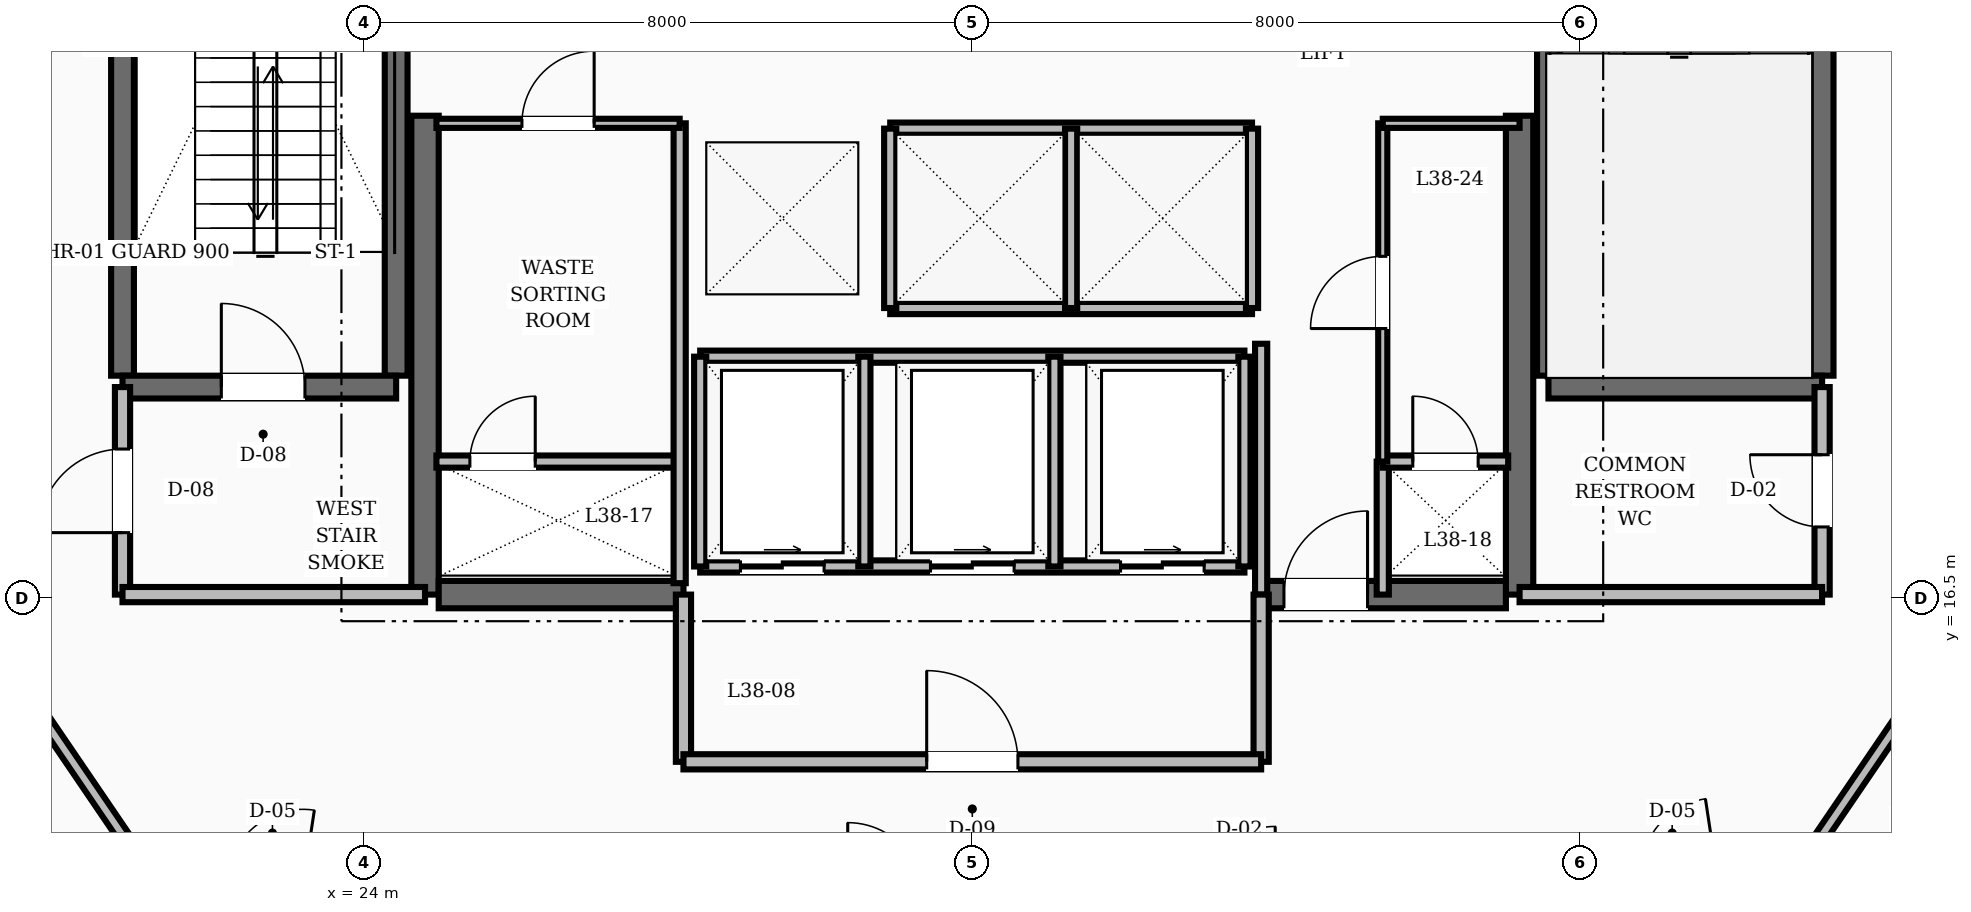
"""IFC4 building model, lengths in metres.
Left out: names, types, materials, properties, quantities, classifications, styles, units other than length and angle.
Written with IfcOpenShell. Run it as: python <this file> out.ifc"""

import sys

from ifc_helpers import new_model, si_unit, direction, frame, frame_2d, origin, place, context, subcontext, project, spatial, rectangle, extrude, element, fill, save


model = new_model("IFC4")
c1 = context("Model", 3, precision=1e-05, world=origin(), true_north=direction((0.0, 1.0)))
c2 = subcontext(c1, "Body", "Model", "MODEL_VIEW")
j1 = project(units=[si_unit("LENGTHUNIT", "METRE"), si_unit("PLANEANGLEUNIT", "RADIAN")], contexts=[c1])
p1 = place(None, origin())
s1 = spatial("IfcSite", under=j1, at=p1, CompositionType="ELEMENT")
p2 = place(p1, origin())
s2 = spatial("IfcBuilding", under=s1, at=p2, CompositionType="ELEMENT")
p3 = place(p2, frame((0.0, 0.0, 149.6)))
s3 = spatial("IfcBuildingStorey", under=s2, at=p3, CompositionType="ELEMENT", Elevation=149.6)
for number, where, z_axis, x_axis in (
    (1, (24.8, 16.55, 0.0), (0.0, 0.0, 1.0), (0.0, 1.0, 0.0)),
    (2, (39.2, 16.55, 0.0), (0.0, 0.0, 1.0), (0.0, 1.0, 0.0)),
):
    element("IfcWall", number, at=place(p3, frame(where, z_axis=z_axis, x_axis=x_axis)), inside=s3, PredefinedType="SHEAR", context=c2, shape_type="SweptSolid", body=[
        extrude(rectangle(XDim=6.3, YDim=0.36, at=frame_2d((3.15, 0.0))), origin(), (0.0, 0.0, 1.0), 3.6),
    ])
p4 = place(p3, frame((24.98, 16.55, 0.0), z_axis=(0.0, 0.0, 1.0), x_axis=(1.0, 0.0, 0.0)))
e3 = element("IfcWall", 3, at=p4, inside=s3, PredefinedType="SHEAR", context=c2, shape_type="SweptSolid", body=[
    extrude(rectangle(XDim=3.22, YDim=0.36, at=frame_2d((1.61, 0.0))), origin(), (0.0, 0.0, 1.0), 3.6),
])
p5 = place(p3, frame((35.8, 16.55, 0.0), z_axis=(0.0, 0.0, 1.0), x_axis=(1.0, 0.0, 0.0)))
e4 = element("IfcWall", 4, at=p5, inside=s3, PredefinedType="SHEAR", context=c2, shape_type="SweptSolid", body=[
    extrude(rectangle(XDim=3.22, YDim=0.36, at=frame_2d((1.61, 0.0))), origin(), (0.0, 0.0, 1.0), 3.6),
])
p6 = place(p5, frame((0.3, 0.0, 0.0)))
e5 = element("IfcOpeningElement", 5, at=p6, cuts=e4, PredefinedType="OPENING", context=c2, shape_type="SweptSolid", body=[
    extrude(rectangle(XDim=1.1, YDim=2.1, at=frame_2d((0.55, 1.05))), frame((0.0, 0.19, 0.0), z_axis=(0.0, -1.0, 0.0), x_axis=(1.0, 0.0, 0.0)), (0.0, 0.0, 1.0), 0.38),
])
for number, where, z_axis, x_axis in (
    (6, (20.82, 19.43, 0.0), (0.0, 0.0, 1.0), (0.0, 1.0, 0.0)),
    (7, (24.42, 19.43, 0.0), (0.0, 0.0, 1.0), (0.0, 1.0, 0.0)),
):
    element("IfcWall", number, at=place(p3, frame(where, z_axis=z_axis, x_axis=x_axis)), inside=s3, PredefinedType="SHEAR", context=c2, shape_type="SweptSolid", body=[
        extrude(rectangle(XDim=8.74, YDim=0.3, at=frame_2d((4.37, 0.0))), origin(), (0.0, 0.0, 1.0), 3.6),
    ])
p7 = place(p3, frame((20.82, 19.28, 0.0), z_axis=(0.0, 0.0, 1.0), x_axis=(1.0, 0.0, 0.0)))
e8 = element("IfcWall", 8, at=p7, inside=s3, PredefinedType="SHEAR", context=c2, shape_type="SweptSolid", body=[
    extrude(rectangle(XDim=3.6, YDim=0.3, at=frame_2d((1.8, 0.0))), origin(), (0.0, 0.0, 1.0), 3.6),
])
p8 = place(p7, frame((1.3, 0.0, 0.0)))
e9 = element("IfcOpeningElement", 9, at=p8, cuts=e8, PredefinedType="OPENING", context=c2, shape_type="SweptSolid", body=[
    extrude(rectangle(XDim=1.1, YDim=2.1, at=frame_2d((0.55, 1.05))), frame((0.0, 0.16, 0.0), z_axis=(0.0, -1.0, 0.0), x_axis=(1.0, 0.0, 0.0)), (0.0, 0.0, 1.0), 0.32),
])
for number, where, z_axis, x_axis in (
    (10, (43.18, 19.43, 0.0), (0.0, 0.0, 1.0), (0.0, 1.0, 0.0)),
    (11, (39.58, 19.43, 0.0), (0.0, 0.0, 1.0), (0.0, 1.0, 0.0)),
):
    element("IfcWall", number, at=place(p3, frame(where, z_axis=z_axis, x_axis=x_axis)), inside=s3, PredefinedType="SHEAR", context=c2, shape_type="SweptSolid", body=[
        extrude(rectangle(XDim=8.74, YDim=0.3, at=frame_2d((4.37, 0.0))), origin(), (0.0, 0.0, 1.0), 3.6),
    ])
p9 = place(p3, frame((39.58, 19.28, 0.0), z_axis=(0.0, 0.0, 1.0), x_axis=(1.0, 0.0, 0.0)))
e12 = element("IfcWall", 12, at=p9, inside=s3, PredefinedType="SHEAR", context=c2, shape_type="SweptSolid", body=[
    extrude(rectangle(XDim=3.6, YDim=0.3, at=frame_2d((1.8, 0.0))), origin(), (0.0, 0.0, 1.0), 3.6),
])
p10 = place(p3, frame((20.82, 16.55, 0.0), z_axis=(0.0, 0.0, 1.0), x_axis=(0.0, 1.0, 0.0)))
e13 = element("IfcWall", 13, at=p10, inside=s3, PredefinedType="SOLIDWALL", context=c2, shape_type="SweptSolid", body=[
    extrude(rectangle(XDim=2.73, YDim=0.2, at=frame_2d((1.365, 0.0))), origin(), (0.0, 0.0, 1.0), 2.8),
])
p11 = place(p10, frame((0.815, 0.0, 0.0)))
e14 = element("IfcOpeningElement", 14, at=p11, cuts=e13, PredefinedType="OPENING", context=c2, shape_type="SweptSolid", body=[
    extrude(rectangle(XDim=1.1, YDim=2.1, at=frame_2d((0.55, 1.05))), frame((0.0, 0.11, 0.0), z_axis=(0.0, -1.0, 0.0), x_axis=(1.0, 0.0, 0.0)), (0.0, 0.0, 1.0), 0.22),
])
p12 = place(p3, frame((20.82, 16.55, 0.0), z_axis=(0.0, 0.0, 1.0), x_axis=(1.0, 0.0, 0.0)))
e15 = element("IfcWall", 15, at=p12, inside=s3, PredefinedType="SOLIDWALL", context=c2, shape_type="SweptSolid", body=[
    extrude(rectangle(XDim=3.98, YDim=0.2, at=frame_2d((1.99, 0.0))), origin(), (0.0, 0.0, 1.0), 2.8),
])
p13 = place(p3, frame((43.18, 16.55, 0.0), z_axis=(0.0, 0.0, 1.0), x_axis=(0.0, 1.0, 0.0)))
e16 = element("IfcWall", 16, at=p13, inside=s3, PredefinedType="SOLIDWALL", context=c2, shape_type="SweptSolid", body=[
    extrude(rectangle(XDim=2.73, YDim=0.2, at=frame_2d((1.365, 0.0))), origin(), (0.0, 0.0, 1.0), 2.8),
])
p14 = place(p13, frame((0.89, 0.0, 0.0)))
e17 = element("IfcOpeningElement", 17, at=p14, cuts=e16, PredefinedType="OPENING", context=c2, shape_type="SweptSolid", body=[
    extrude(rectangle(XDim=0.95, YDim=2.1, at=frame_2d((0.475, 1.05))), frame((0.0, 0.11, 0.0), z_axis=(0.0, -1.0, 0.0), x_axis=(1.0, 0.0, 0.0)), (0.0, 0.0, 1.0), 0.22),
])
p15 = place(p3, frame((39.2, 16.55, 0.0), z_axis=(0.0, 0.0, 1.0), x_axis=(1.0, 0.0, 0.0)))
e18 = element("IfcWall", 18, at=p15, inside=s3, PredefinedType="SOLIDWALL", context=c2, shape_type="SweptSolid", body=[
    extrude(rectangle(XDim=3.98, YDim=0.2, at=frame_2d((1.99, 0.0))), origin(), (0.0, 0.0, 1.0), 2.8),
])
p16 = place(p3, frame((35.8, 16.55, 0.0), z_axis=(0.0, 0.0, 1.0), x_axis=(0.0, 1.0, 0.0)))
e19 = element("IfcWall", 19, at=p16, inside=s3, PredefinedType="SOLIDWALL", context=c2, shape_type="SweptSolid", body=[
    extrude(rectangle(XDim=3.3, YDim=0.16, at=frame_2d((1.65, 0.0))), origin(), (0.0, 0.0, 1.0), 2.8),
])
p17 = place(p3, frame((37.4, 16.55, 0.0), z_axis=(0.0, 0.0, 1.0), x_axis=(0.0, 1.0, 0.0)))
e20 = element("IfcWall", 20, at=p17, inside=s3, PredefinedType="SOLIDWALL", context=c2, shape_type="SweptSolid", body=[
    extrude(rectangle(XDim=1.75, YDim=0.16, at=frame_2d((0.875, 0.0))), origin(), (0.0, 0.0, 1.0), 2.8),
])
for number, where, z_axis, x_axis in (
    (21, (28.2, 14.35, 0.0), (0.0, 0.0, 1.0), (0.0, 1.0, 0.0)),
    (22, (35.8, 14.35, 0.0), (0.0, 0.0, 1.0), (0.0, 1.0, 0.0)),
):
    element("IfcWall", number, at=place(p3, frame(where, z_axis=z_axis, x_axis=x_axis)), inside=s3, PredefinedType="SOLIDWALL", context=c2, shape_type="SweptSolid", body=[
        extrude(rectangle(XDim=2.2, YDim=0.2, at=frame_2d((1.1, 0.0))), origin(), (0.0, 0.0, 1.0), 2.8),
    ])
p18 = place(p3, frame((28.2, 14.35, 0.0), z_axis=(0.0, 0.0, 1.0), x_axis=(1.0, 0.0, 0.0)))
e23 = element("IfcWall", 23, at=p18, inside=s3, PredefinedType="SOLIDWALL", context=c2, shape_type="SweptSolid", body=[
    extrude(rectangle(XDim=7.6, YDim=0.2, at=frame_2d((3.8, 0.0))), origin(), (0.0, 0.0, 1.0), 2.8),
])
p19 = place(p18, frame((3.2, 0.0, 0.0)))
e24 = element("IfcOpeningElement", 24, at=p19, cuts=e23, PredefinedType="OPENING", context=c2, shape_type="SweptSolid", body=[
    extrude(rectangle(XDim=1.2, YDim=2.1, at=frame_2d((0.6, 1.05))), frame((0.0, 0.11, 0.0), z_axis=(0.0, -1.0, 0.0), x_axis=(1.0, 0.0, 0.0)), (0.0, 0.0, 1.0), 0.22),
])
for number, where, z_axis, x_axis in (
    (25, (30.92, 22.68, 0.0), (0.0, 0.0, 1.0), (1.0, 0.0, 0.0)),
    (26, (30.92, 20.32, 0.0), (0.0, 0.0, 1.0), (1.0, 0.0, 0.0)),
):
    element("IfcWall", number, at=place(p3, frame(where, z_axis=z_axis, x_axis=x_axis)), inside=s3, PredefinedType="SOLIDWALL", context=c2, shape_type="SweptSolid", body=[
        extrude(rectangle(XDim=4.76, YDim=0.16, at=frame_2d((2.38, 0.0))), origin(), (0.0, 0.0, 1.0), 2.8),
    ])
for number, where, z_axis, x_axis in (
    (27, (30.92, 20.32, 0.0), (0.0, 0.0, 1.0), (0.0, 1.0, 0.0)),
    (28, (33.3, 20.32, 0.0), (0.0, 0.0, 1.0), (0.0, 1.0, 0.0)),
    (29, (35.68, 20.32, 0.0), (0.0, 0.0, 1.0), (0.0, 1.0, 0.0)),
):
    element("IfcWall", number, at=place(p3, frame(where, z_axis=z_axis, x_axis=x_axis)), inside=s3, PredefinedType="SOLIDWALL", context=c2, shape_type="SweptSolid", body=[
        extrude(rectangle(XDim=2.36, YDim=0.16, at=frame_2d((1.18, 0.0))), origin(), (0.0, 0.0, 1.0), 2.8),
    ])
p20 = place(p3, frame((28.42, 16.92, 0.0), z_axis=(0.0, 0.0, 1.0), x_axis=(1.0, 0.0, 0.0)))
e30 = element("IfcWall", 30, at=p20, inside=s3, PredefinedType="SOLIDWALL", context=c2, shape_type="SweptSolid", body=[
    extrude(rectangle(XDim=7.16, YDim=0.16, at=frame_2d((3.58, 0.0))), origin(), (0.0, 0.0, 1.0), 2.8),
])
p21 = place(p20, frame((0.53, 0.0, 0.0)))
e31 = element("IfcOpeningElement", 31, at=p21, cuts=e30, PredefinedType="OPENING", context=c2, shape_type="SweptSolid", body=[
    extrude(rectangle(XDim=1.1, YDim=2.15, at=frame_2d((0.55, 1.075))), frame((0.0, 0.09, 0.0), z_axis=(0.0, -1.0, 0.0), x_axis=(1.0, 0.0, 0.0)), (0.0, 0.0, 1.0), 0.18),
])
p22 = place(p20, frame((3.03, 0.0, 0.0)))
e32 = element("IfcOpeningElement", 32, at=p22, cuts=e30, PredefinedType="OPENING", context=c2, shape_type="SweptSolid", body=[
    extrude(rectangle(XDim=1.1, YDim=2.15, at=frame_2d((0.55, 1.075))), frame((0.0, 0.09, 0.0), z_axis=(0.0, -1.0, 0.0), x_axis=(1.0, 0.0, 0.0)), (0.0, 0.0, 1.0), 0.18),
])
p23 = place(p20, frame((5.53, 0.0, 0.0)))
e33 = element("IfcOpeningElement", 33, at=p23, cuts=e30, PredefinedType="OPENING", context=c2, shape_type="SweptSolid", body=[
    extrude(rectangle(XDim=1.1, YDim=2.15, at=frame_2d((0.55, 1.075))), frame((0.0, 0.09, 0.0), z_axis=(0.0, -1.0, 0.0), x_axis=(1.0, 0.0, 0.0)), (0.0, 0.0, 1.0), 0.18),
])
p24 = place(p3, frame((28.42, 19.68, 0.0), z_axis=(0.0, 0.0, 1.0), x_axis=(1.0, 0.0, 0.0)))
e34 = element("IfcWall", 34, at=p24, inside=s3, PredefinedType="SOLIDWALL", context=c2, shape_type="SweptSolid", body=[
    extrude(rectangle(XDim=7.16, YDim=0.16, at=frame_2d((3.58, 0.0))), origin(), (0.0, 0.0, 1.0), 2.8),
])
for number, where, z_axis, x_axis in (
    (35, (28.42, 16.92, 0.0), (0.0, 0.0, 1.0), (0.0, 1.0, 0.0)),
    (36, (30.58, 16.92, 0.0), (0.0, 0.0, 1.0), (0.0, 1.0, 0.0)),
    (37, (33.08, 16.92, 0.0), (0.0, 0.0, 1.0), (0.0, 1.0, 0.0)),
    (38, (35.58, 16.92, 0.0), (0.0, 0.0, 1.0), (0.0, 1.0, 0.0)),
):
    element("IfcWall", number, at=place(p3, frame(where, z_axis=z_axis, x_axis=x_axis)), inside=s3, PredefinedType="SOLIDWALL", context=c2, shape_type="SweptSolid", body=[
        extrude(rectangle(XDim=2.76, YDim=0.16, at=frame_2d((1.38, 0.0))), origin(), (0.0, 0.0, 1.0), 2.8),
    ])
p25 = place(p3, frame((24.95, 18.3, 0.0), z_axis=(0.0, 0.0, 1.0), x_axis=(1.0, 0.0, 0.0)))
e39 = element("IfcWall", 39, at=p25, inside=s3, PredefinedType="SOLIDWALL", context=c2, shape_type="SweptSolid", body=[
    extrude(rectangle(XDim=3.2, YDim=0.16, at=frame_2d((1.6, 0.0))), origin(), (0.0, 0.0, 1.0), 2.8),
])
p26 = place(p25, frame((0.44, 0.0, 0.0)))
e40 = element("IfcOpeningElement", 40, at=p26, cuts=e39, PredefinedType="OPENING", context=c2, shape_type="SweptSolid", body=[
    extrude(rectangle(XDim=0.86, YDim=2.05, at=frame_2d((0.43, 1.025))), frame((0.0, 0.09, 0.0), z_axis=(0.0, -1.0, 0.0), x_axis=(1.0, 0.0, 0.0)), (0.0, 0.0, 1.0), 0.18),
])
p27 = place(p3, frame((28.15, 16.7, 0.0), z_axis=(0.0, 0.0, 1.0), x_axis=(0.0, 1.0, 0.0)))
e41 = element("IfcWall", 41, at=p27, inside=s3, PredefinedType="SOLIDWALL", context=c2, shape_type="SweptSolid", body=[
    extrude(rectangle(XDim=6.05, YDim=0.16, at=frame_2d((3.025, 0.0))), origin(), (0.0, 0.0, 1.0), 2.8),
])
p28 = place(p3, frame((37.4, 18.3, 0.0), z_axis=(0.0, 0.0, 1.0), x_axis=(1.0, 0.0, 0.0)))
e42 = element("IfcWall", 42, at=p28, inside=s3, PredefinedType="SOLIDWALL", context=c2, shape_type="SweptSolid", body=[
    extrude(rectangle(XDim=1.65, YDim=0.16, at=frame_2d((0.825, 0.0))), origin(), (0.0, 0.0, 1.0), 2.8),
])
p29 = place(p28, frame((0.395, 0.0, 0.0)))
e43 = element("IfcOpeningElement", 43, at=p29, cuts=e42, PredefinedType="OPENING", context=c2, shape_type="SweptSolid", body=[
    extrude(rectangle(XDim=0.86, YDim=2.1, at=frame_2d((0.43, 1.05))), frame((0.0, 0.09, 0.0), z_axis=(0.0, -1.0, 0.0), x_axis=(1.0, 0.0, 0.0)), (0.0, 0.0, 1.0), 0.18),
])
p30 = place(p3, frame((24.95, 22.75, 0.0), z_axis=(0.0, 0.0, 1.0), x_axis=(1.0, 0.0, 0.0)))
e44 = element("IfcWall", 44, at=p30, inside=s3, PredefinedType="PARTITIONING", context=c2, shape_type="SweptSolid", body=[
    extrude(rectangle(XDim=3.2, YDim=0.12, at=frame_2d((1.6, 0.0))), origin(), (0.0, 0.0, 1.0), 2.8),
])
p31 = place(p30, frame((1.125, 0.0, 0.0)))
e45 = element("IfcOpeningElement", 45, at=p31, cuts=e44, PredefinedType="OPENING", context=c2, shape_type="SweptSolid", body=[
    extrude(rectangle(XDim=0.95, YDim=2.1, at=frame_2d((0.475, 1.05))), frame((0.0, 0.07, 0.0), z_axis=(0.0, -1.0, 0.0), x_axis=(1.0, 0.0, 0.0)), (0.0, 0.0, 1.0), 0.14),
])
p32 = place(p3, frame((37.4, 18.3, 0.0), z_axis=(0.0, 0.0, 1.0), x_axis=(0.0, 1.0, 0.0)))
e46 = element("IfcWall", 46, at=p32, inside=s3, PredefinedType="PARTITIONING", context=c2, shape_type="SweptSolid", body=[
    extrude(rectangle(XDim=4.45, YDim=0.12, at=frame_2d((2.225, 0.0))), origin(), (0.0, 0.0, 1.0), 2.8),
])
p33 = place(p32, frame((1.75, 0.0, 0.0)))
e47 = element("IfcOpeningElement", 47, at=p33, cuts=e46, PredefinedType="OPENING", context=c2, shape_type="SweptSolid", body=[
    extrude(rectangle(XDim=0.95, YDim=2.1, at=frame_2d((0.475, 1.05))), frame((0.0, 0.07, 0.0), z_axis=(0.0, -1.0, 0.0), x_axis=(1.0, 0.0, 0.0)), (0.0, 0.0, 1.0), 0.14),
])
p34 = place(p3, frame((37.4, 22.75, 0.0), z_axis=(0.0, 0.0, 1.0), x_axis=(1.0, 0.0, 0.0)))
e48 = element("IfcWall", 48, at=p34, inside=s3, PredefinedType="PARTITIONING", context=c2, shape_type="SweptSolid", body=[
    extrude(rectangle(XDim=1.8, YDim=0.12, at=frame_2d((0.9, 0.0))), origin(), (0.0, 0.0, 1.0), 2.8),
])
for number, where, z_axis, x_axis in (
    (49, (19.35, 15.548, 0.0), (0.0, 0.0, 1.0), (0.563, -0.827, 0.0)),
    (50, (42.95, 13.05, 0.0), (0.0, 0.0, 1.0), (0.563, 0.827, 0.0)),
):
    element("IfcWall", number, at=place(p3, frame(where, z_axis=z_axis, x_axis=x_axis)), inside=s3, PredefinedType="SOLIDWALL", context=c2, shape_type="SweptSolid", body=[
        extrude(rectangle(XDim=3.021, YDim=0.16, at=frame_2d((1.511, 0.0))), origin(), (0.0, 0.0, 1.0), 2.8),
    ])
p35 = place(p8, origin())
e51 = element("IfcDoor", 51, at=p35, inside=s3, OperationType="SINGLE_SWING_LEFT", PredefinedType="DOOR", context=c2, shape_type="SweptSolid", body=[
    extrude(rectangle(XDim=1.1, YDim=2.1, at=frame_2d((0.55, 1.05))), frame((0.0, 0.025, 0.0), z_axis=(0.0, -1.0, 0.0), x_axis=(1.0, 0.0, 0.0)), (0.0, 0.0, 1.0), 0.05),
])
fill(e9, e51)
p36 = place(p11, origin())
e52 = element("IfcDoor", 52, at=p36, inside=s3, OperationType="SINGLE_SWING_LEFT", PredefinedType="DOOR", context=c2, shape_type="SweptSolid", body=[
    extrude(rectangle(XDim=1.1, YDim=2.1, at=frame_2d((0.55, 1.05))), frame((0.0, 0.025, 0.0), z_axis=(0.0, -1.0, 0.0), x_axis=(1.0, 0.0, 0.0)), (0.0, 0.0, 1.0), 0.05),
])
fill(e14, e52)
p37 = place(p14, origin())
e53 = element("IfcDoor", 53, at=p37, inside=s3, OperationType="SINGLE_SWING_RIGHT", PredefinedType="DOOR", context=c2, shape_type="SweptSolid", body=[
    extrude(rectangle(XDim=0.95, YDim=2.1, at=frame_2d((0.475, 1.05))), frame((0.0, 0.025, 0.0), z_axis=(0.0, -1.0, 0.0), x_axis=(1.0, 0.0, 0.0)), (0.0, 0.0, 1.0), 0.05),
])
fill(e17, e53)
p38 = place(p6, origin())
e54 = element("IfcDoor", 54, at=p38, inside=s3, OperationType="SINGLE_SWING_RIGHT", PredefinedType="DOOR", context=c2, shape_type="SweptSolid", body=[
    extrude(rectangle(XDim=1.1, YDim=2.1, at=frame_2d((0.55, 1.05))), frame((0.0, 0.025, 0.0), z_axis=(0.0, -1.0, 0.0), x_axis=(1.0, 0.0, 0.0)), (0.0, 0.0, 1.0), 0.05),
])
fill(e5, e54)
p39 = place(p19, origin())
e55 = element("IfcDoor", 55, at=p39, inside=s3, OperationType="SINGLE_SWING_LEFT", PredefinedType="DOOR", context=c2, shape_type="SweptSolid", body=[
    extrude(rectangle(XDim=1.2, YDim=2.1, at=frame_2d((0.6, 1.05))), frame((0.0, 0.025, 0.0), z_axis=(0.0, -1.0, 0.0), x_axis=(1.0, 0.0, 0.0)), (0.0, 0.0, 1.0), 0.05),
])
fill(e24, e55)
p40 = place(p21, origin())
e56 = element("IfcDoor", 56, at=p40, inside=s3, OperationType="SLIDING_TO_RIGHT", PredefinedType="DOOR", context=c2, shape_type="SweptSolid", body=[
    extrude(rectangle(XDim=1.1, YDim=2.15, at=frame_2d((0.55, 1.075))), frame((0.0, 0.025, 0.0), z_axis=(0.0, -1.0, 0.0), x_axis=(1.0, 0.0, 0.0)), (0.0, 0.0, 1.0), 0.05),
])
fill(e31, e56)
p41 = place(p22, origin())
e57 = element("IfcDoor", 57, at=p41, inside=s3, OperationType="SLIDING_TO_RIGHT", PredefinedType="DOOR", context=c2, shape_type="SweptSolid", body=[
    extrude(rectangle(XDim=1.1, YDim=2.15, at=frame_2d((0.55, 1.075))), frame((0.0, 0.025, 0.0), z_axis=(0.0, -1.0, 0.0), x_axis=(1.0, 0.0, 0.0)), (0.0, 0.0, 1.0), 0.05),
])
fill(e32, e57)
p42 = place(p23, origin())
e58 = element("IfcDoor", 58, at=p42, inside=s3, OperationType="SLIDING_TO_RIGHT", PredefinedType="DOOR", context=c2, shape_type="SweptSolid", body=[
    extrude(rectangle(XDim=1.1, YDim=2.15, at=frame_2d((0.55, 1.075))), frame((0.0, 0.025, 0.0), z_axis=(0.0, -1.0, 0.0), x_axis=(1.0, 0.0, 0.0)), (0.0, 0.0, 1.0), 0.05),
])
fill(e33, e58)
p43 = place(p26, origin())
e59 = element("IfcDoor", 59, at=p43, inside=s3, OperationType="SINGLE_SWING_RIGHT", PredefinedType="TRAPDOOR", context=c2, shape_type="SweptSolid", body=[
    extrude(rectangle(XDim=0.86, YDim=2.05, at=frame_2d((0.43, 1.025))), frame((0.0, 0.025, 0.0), z_axis=(0.0, -1.0, 0.0), x_axis=(1.0, 0.0, 0.0)), (0.0, 0.0, 1.0), 0.05),
])
fill(e40, e59)
p44 = place(p29, origin())
e60 = element("IfcDoor", 60, at=p44, inside=s3, OperationType="SINGLE_SWING_LEFT", PredefinedType="TRAPDOOR", context=c2, shape_type="SweptSolid", body=[
    extrude(rectangle(XDim=0.86, YDim=2.1, at=frame_2d((0.43, 1.05))), frame((0.0, 0.025, 0.0), z_axis=(0.0, -1.0, 0.0), x_axis=(1.0, 0.0, 0.0)), (0.0, 0.0, 1.0), 0.05),
])
fill(e43, e60)
p45 = place(p31, origin())
e61 = element("IfcDoor", 61, at=p45, inside=s3, OperationType="SINGLE_SWING_RIGHT", PredefinedType="DOOR", context=c2, shape_type="SweptSolid", body=[
    extrude(rectangle(XDim=0.95, YDim=2.1, at=frame_2d((0.475, 1.05))), frame((0.0, 0.025, 0.0), z_axis=(0.0, -1.0, 0.0), x_axis=(1.0, 0.0, 0.0)), (0.0, 0.0, 1.0), 0.05),
])
fill(e45, e61)
p46 = place(p33, origin())
e62 = element("IfcDoor", 62, at=p46, inside=s3, OperationType="SINGLE_SWING_LEFT", PredefinedType="DOOR", context=c2, shape_type="SweptSolid", body=[
    extrude(rectangle(XDim=0.95, YDim=2.1, at=frame_2d((0.475, 1.05))), frame((0.0, 0.025, 0.0), z_axis=(0.0, -1.0, 0.0), x_axis=(1.0, 0.0, 0.0)), (0.0, 0.0, 1.0), 0.05),
])
fill(e47, e62)
save(model, sys.argv[1])
